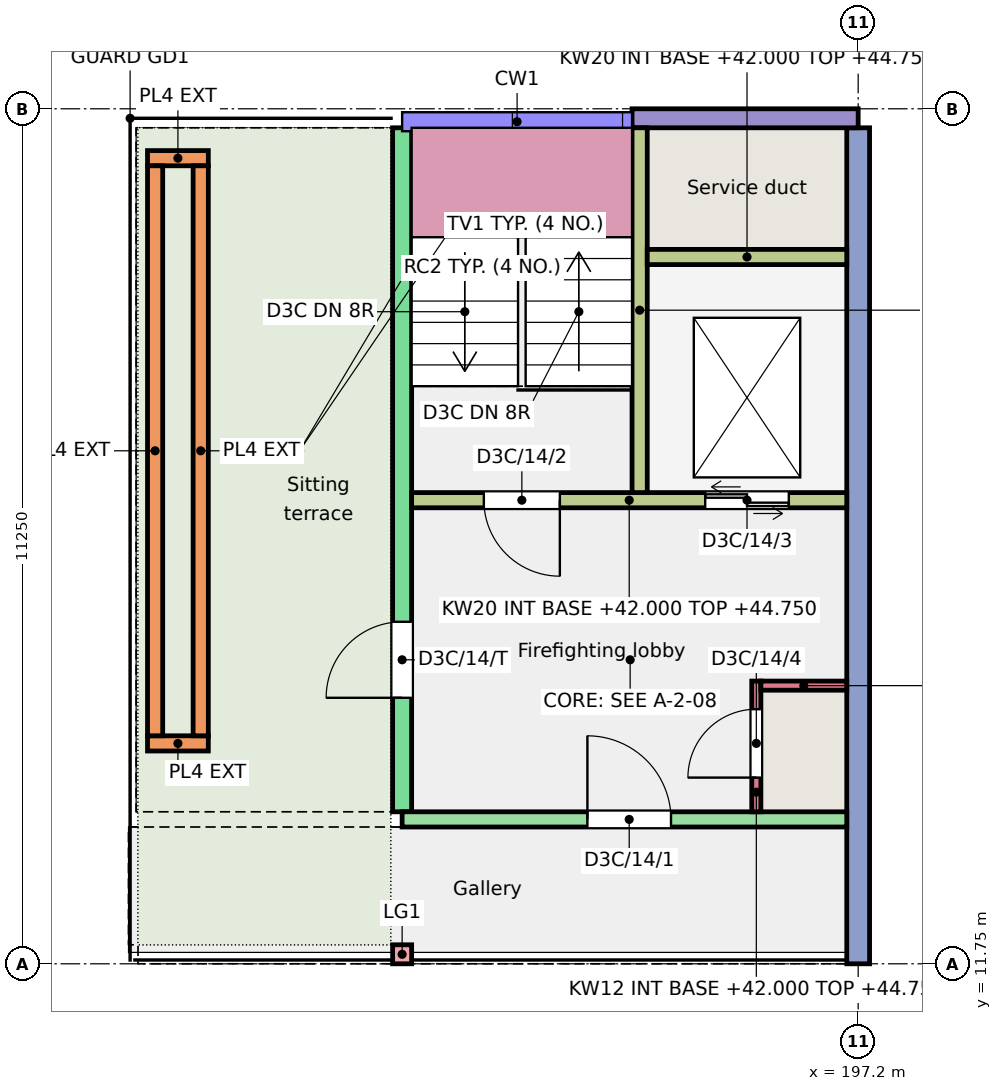
"""IFC4 building model, lengths in metres.
Left out: names, types, materials, properties, quantities, classifications, styles, units other than length and angle.
Written with IfcOpenShell. Run it as: python <this file> out.ifc"""

import sys

from ifc_helpers import new_model, si_unit, direction, frame, frame_2d, origin, origin_2d, place, context, subcontext, project, spatial, rectangle, extrude, element, fill, save


model = new_model("IFC4")
c1 = context("Model", 3, precision=1e-05, world=origin(), true_north=direction((0.0, 1.0)))
c2 = subcontext(c1, "Body", "Model", "MODEL_VIEW")
j1 = project(units=[si_unit("LENGTHUNIT", "METRE"), si_unit("PLANEANGLEUNIT", "RADIAN")], contexts=[c1])
p1 = place(None, origin())
s1 = spatial("IfcSite", under=j1, at=p1, CompositionType="ELEMENT")
p2 = place(p1, origin())
s2 = spatial("IfcBuilding", under=s1, at=p2, CompositionType="ELEMENT")
p3 = place(p2, frame((0.0, 0.0, 42.0)))
s3 = spatial("IfcBuildingStorey", under=s2, at=p3, CompositionType="ELEMENT", Elevation=42.0)
p4 = place(p3, frame((191.2, 13.75, 0.0), z_axis=(0.0, 0.0, 1.0), x_axis=(0.0, 1.0, 0.0)))
e1 = element("IfcWall", 1, at=p4, inside=s3, PredefinedType="SHEAR", context=c2, shape_type="SweptSolid", body=[
    extrude(rectangle(XDim=9.0, YDim=0.25, at=frame_2d((4.5, 0.0))), origin(), (0.0, 0.0, 1.0), 3.0),
])
p5 = place(p4, frame((1.5, 0.0, 0.0)))
e2 = element("IfcOpeningElement", 2, at=p5, cuts=e1, PredefinedType="OPENING", context=c2, shape_type="SweptSolid", body=[
    extrude(rectangle(XDim=1.0, YDim=2.1, at=frame_2d((0.5, 1.05))), frame((0.0, 0.135, 0.0), z_axis=(0.0, -1.0, 0.0), x_axis=(1.0, 0.0, 0.0)), (0.0, 0.0, 1.0), 0.27),
])
p6 = place(p3, frame((197.2, 11.75, 0.0), z_axis=(0.0, 0.0, 1.0), x_axis=(0.0, 1.0, 0.0)))
e3 = element("IfcWall", 3, at=p6, inside=s3, PredefinedType="SHEAR", context=c2, shape_type="SweptSolid", body=[
    extrude(rectangle(XDim=11.0, YDim=0.3, at=frame_2d((5.5, 0.0))), origin(), (0.0, 0.0, 1.0), 3.0),
])
p7 = place(p3, frame((194.225, 22.875, 0.0), z_axis=(0.0, 0.0, 1.0), x_axis=(1.0, 0.0, 0.0)))
e4 = element("IfcWall", 4, at=p7, inside=s3, PredefinedType="SOLIDWALL", context=c2, shape_type="SweptSolid", body=[
    extrude(rectangle(XDim=2.975, YDim=0.25, at=frame_2d((1.487, 0.0))), origin(), (0.0, 0.0, 1.0), 3.0),
])
p8 = place(p3, frame((191.2, 13.65, 0.0), z_axis=(0.0, 0.0, 1.0), x_axis=(1.0, 0.0, 0.0)))
e5 = element("IfcWall", 5, at=p8, inside=s3, PredefinedType="SHEAR", context=c2, shape_type="SweptSolid", body=[
    extrude(rectangle(XDim=5.85, YDim=0.2, at=frame_2d((2.925, 0.0))), origin(), (0.0, 0.0, 1.0), 2.75),
])
p9 = place(p8, frame((2.438, 0.0, 0.0)))
e6 = element("IfcOpeningElement", 6, at=p9, cuts=e5, PredefinedType="OPENING", context=c2, shape_type="SweptSolid", body=[
    extrude(rectangle(XDim=1.1, YDim=2.1, at=frame_2d((0.55, 1.05))), frame((0.0, 0.11, 0.0), z_axis=(0.0, -1.0, 0.0), x_axis=(1.0, 0.0, 0.0)), (0.0, 0.0, 1.0), 0.22),
])
p10 = place(p3, frame((191.325, 17.85, 0.0), z_axis=(0.0, 0.0, 1.0), x_axis=(1.0, 0.0, 0.0)))
e7 = element("IfcWall", 7, at=p10, inside=s3, PredefinedType="SHEAR", context=c2, shape_type="SweptSolid", body=[
    extrude(rectangle(XDim=5.725, YDim=0.2, at=frame_2d((2.863, 0.0))), origin(), (0.0, 0.0, 1.0), 2.75),
])
p11 = place(p10, frame((0.95, 0.0, 0.0)))
e8 = element("IfcOpeningElement", 8, at=p11, cuts=e7, PredefinedType="OPENING", context=c2, shape_type="SweptSolid", body=[
    extrude(rectangle(XDim=1.0, YDim=2.1, at=frame_2d((0.5, 1.05))), frame((0.0, 0.11, 0.0), z_axis=(0.0, -1.0, 0.0), x_axis=(1.0, 0.0, 0.0)), (0.0, 0.0, 1.0), 0.22),
])
p12 = place(p10, frame((3.863, 0.0, 0.0)))
e9 = element("IfcOpeningElement", 9, at=p12, cuts=e7, PredefinedType="OPENING", context=c2, shape_type="SweptSolid", body=[
    extrude(rectangle(XDim=1.1, YDim=2.1, at=frame_2d((0.55, 1.05))), frame((0.0, 0.11, 0.0), z_axis=(0.0, -1.0, 0.0), x_axis=(1.0, 0.0, 0.0)), (0.0, 0.0, 1.0), 0.22),
])
p13 = place(p3, frame((194.325, 17.95, 0.0), z_axis=(0.0, 0.0, 1.0), x_axis=(0.0, 1.0, 0.0)))
e10 = element("IfcWall", 10, at=p13, inside=s3, PredefinedType="SHEAR", context=c2, shape_type="SweptSolid", body=[
    extrude(rectangle(XDim=4.8, YDim=0.2, at=frame_2d((2.4, 0.0))), origin(), (0.0, 0.0, 1.0), 2.75),
])
p14 = place(p3, frame((194.425, 21.05, 0.0), z_axis=(0.0, 0.0, 1.0), x_axis=(1.0, 0.0, 0.0)))
e11 = element("IfcWall", 11, at=p14, inside=s3, PredefinedType="SHEAR", context=c2, shape_type="SweptSolid", body=[
    extrude(rectangle(XDim=2.625, YDim=0.2, at=frame_2d((1.312, 0.0))), origin(), (0.0, 0.0, 1.0), 2.75),
])
p15 = place(p3, frame((195.86, 13.75, 0.0), z_axis=(0.0, 0.0, 1.0), x_axis=(0.0, 1.0, 0.0)))
e12 = element("IfcWall", 12, at=p15, inside=s3, PredefinedType="SHEAR", context=c2, shape_type="SweptSolid", body=[
    extrude(rectangle(XDim=1.72, YDim=0.12, at=frame_2d((0.86, 0.0))), origin(), (0.0, 0.0, 1.0), 2.75),
])
p16 = place(p15, frame((0.45, 0.0, 0.0)))
e13 = element("IfcOpeningElement", 13, at=p16, cuts=e12, PredefinedType="OPENING", context=c2, shape_type="SweptSolid", body=[
    extrude(rectangle(XDim=0.9, YDim=2.1, at=frame_2d((0.45, 1.05))), frame((0.0, 0.07, 0.0), z_axis=(0.0, -1.0, 0.0), x_axis=(1.0, 0.0, 0.0)), (0.0, 0.0, 1.0), 0.14),
])
p17 = place(p3, frame((195.92, 15.41, 0.0), z_axis=(0.0, 0.0, 1.0), x_axis=(1.0, 0.0, 0.0)))
e14 = element("IfcWall", 14, at=p17, inside=s3, PredefinedType="SHEAR", context=c2, shape_type="SweptSolid", body=[
    extrude(rectangle(XDim=1.13, YDim=0.12, at=frame_2d((0.565, 0.0))), origin(), (0.0, 0.0, 1.0), 2.75),
])
p18 = place(p3, frame((191.2, 11.875, 0.0), z_axis=(0.0, 0.0, 1.0), x_axis=(1.0, 0.0, 0.0)))
e15 = element("IfcColumn", 15, at=p18, inside=s3, PredefinedType="COLUMN", context=c2, shape_type="SweptSolid", body=[
    extrude(rectangle(XDim=0.25, YDim=0.25, at=origin_2d()), origin(), (0.0, 0.0, 1.0), 3.0),
])
for number, where, z_axis, x_axis in (
    (16, (187.85, 14.65, 0.01), (0.0, 0.0, 1.0), (1.0, 0.0, 0.0)),
    (17, (187.85, 22.35, 0.01), (0.0, 0.0, 1.0), (1.0, 0.0, 0.0)),
):
    element("IfcWall", number, at=place(p3, frame(where, z_axis=z_axis, x_axis=x_axis)), inside=s3, PredefinedType="SOLIDWALL", context=c2, shape_type="SweptSolid", body=[
        extrude(rectangle(XDim=0.8, YDim=0.2, at=frame_2d((0.4, 0.0))), origin(), (0.0, 0.0, 1.0), 0.45),
    ])
for number, where, z_axis, x_axis in (
    (18, (187.95, 14.75, 0.01), (0.0, 0.0, 1.0), (0.0, 1.0, 0.0)),
    (19, (188.55, 14.75, 0.01), (0.0, 0.0, 1.0), (0.0, 1.0, 0.0)),
):
    element("IfcWall", number, at=place(p3, frame(where, z_axis=z_axis, x_axis=x_axis)), inside=s3, PredefinedType="SOLIDWALL", context=c2, shape_type="SweptSolid", body=[
        extrude(rectangle(XDim=7.5, YDim=0.2, at=frame_2d((3.75, 0.0))), origin(), (0.0, 0.0, 1.0), 0.45),
    ])
p19 = place(p9, origin())
e20 = element("IfcDoor", 20, at=p19, inside=s3, OperationType="SINGLE_SWING_LEFT", PredefinedType="DOOR", context=c2, shape_type="SweptSolid", body=[
    extrude(rectangle(XDim=1.1, YDim=2.1, at=frame_2d((0.55, 1.05))), frame((0.0, 0.025, 0.0), z_axis=(0.0, -1.0, 0.0), x_axis=(1.0, 0.0, 0.0)), (0.0, 0.0, 1.0), 0.05),
])
fill(e6, e20)
p20 = place(p11, origin())
e21 = element("IfcDoor", 21, at=p20, inside=s3, OperationType="SINGLE_SWING_RIGHT", PredefinedType="DOOR", context=c2, shape_type="SweptSolid", body=[
    extrude(rectangle(XDim=1.0, YDim=2.1, at=frame_2d((0.5, 1.05))), frame((0.0, 0.025, 0.0), z_axis=(0.0, -1.0, 0.0), x_axis=(1.0, 0.0, 0.0)), (0.0, 0.0, 1.0), 0.05),
])
fill(e8, e21)
p21 = place(p12, origin())
e22 = element("IfcDoor", 22, at=p21, inside=s3, OperationType="DOUBLE_DOOR_SLIDING", PredefinedType="DOOR", context=c2, shape_type="SweptSolid", body=[
    extrude(rectangle(XDim=1.1, YDim=2.1, at=frame_2d((0.55, 1.05))), frame((0.0, 0.025, 0.0), z_axis=(0.0, -1.0, 0.0), x_axis=(1.0, 0.0, 0.0)), (0.0, 0.0, 1.0), 0.05),
])
fill(e9, e22)
p22 = place(p16, origin())
e23 = element("IfcDoor", 23, at=p22, inside=s3, OperationType="SINGLE_SWING_LEFT", PredefinedType="DOOR", context=c2, shape_type="SweptSolid", body=[
    extrude(rectangle(XDim=0.9, YDim=2.1, at=frame_2d((0.45, 1.05))), frame((0.0, 0.025, 0.0), z_axis=(0.0, -1.0, 0.0), x_axis=(1.0, 0.0, 0.0)), (0.0, 0.0, 1.0), 0.05),
])
fill(e13, e23)
p23 = place(p5, origin())
e24 = element("IfcDoor", 24, at=p23, inside=s3, OperationType="SINGLE_SWING_LEFT", PredefinedType="DOOR", context=c2, shape_type="SweptSolid", body=[
    extrude(rectangle(XDim=1.0, YDim=2.1, at=frame_2d((0.5, 1.05))), frame((0.0, 0.025, 0.0), z_axis=(0.0, -1.0, 0.0), x_axis=(1.0, 0.0, 0.0)), (0.0, 0.0, 1.0), 0.05),
])
fill(e2, e24)
save(model, sys.argv[1])
